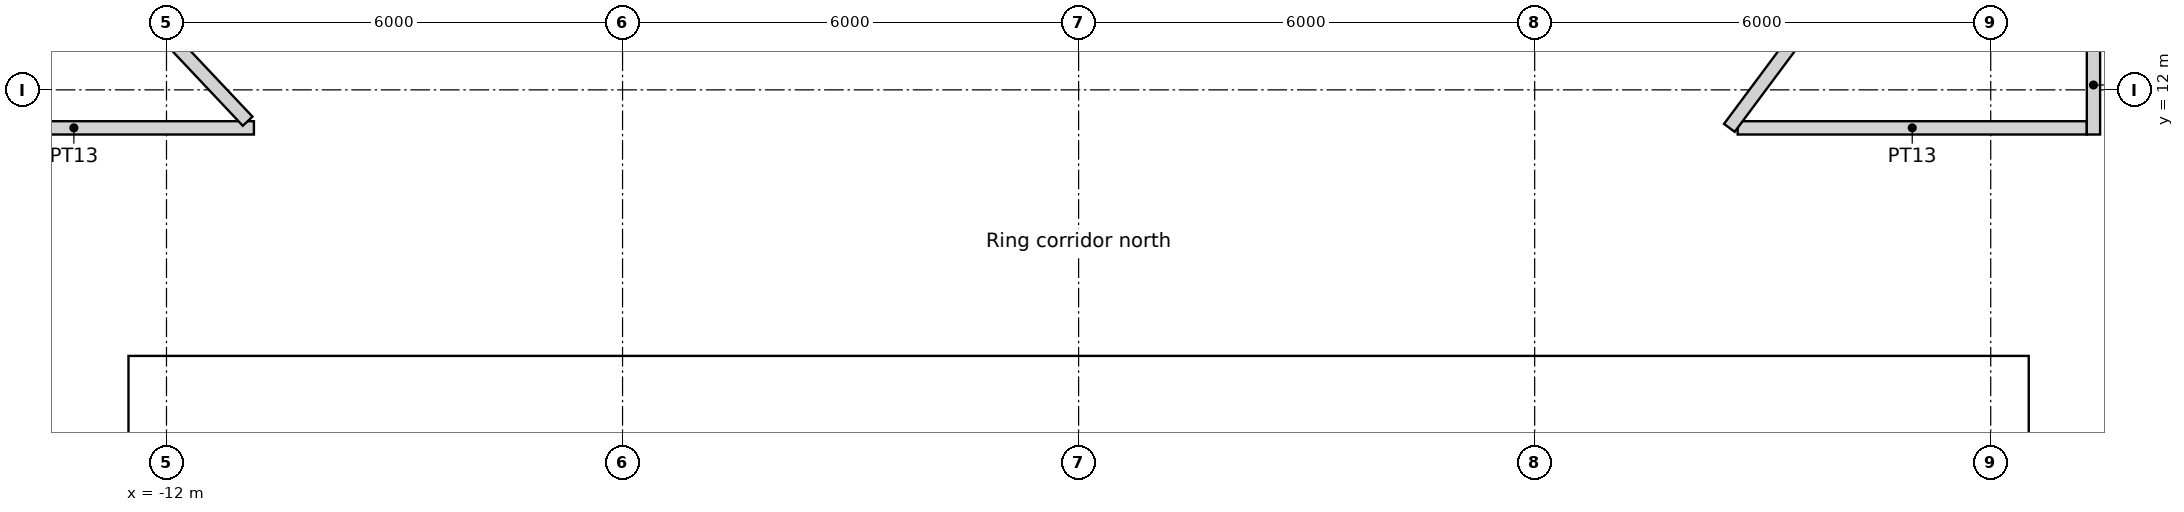
"""IFC4 building model, lengths in metres.
Left out: names, types, materials, properties, quantities, classifications, styles, units other than length and angle.
Written with IfcOpenShell. Run it as: python <this file> out.ifc"""

import sys

from ifc_helpers import new_model, si_unit, direction, frame, frame_2d, origin, origin_2d, place, context, subcontext, project, spatial, rectangle, circle, extrude, element, fill, save


model = new_model("IFC4")
c1 = context("Model", 3, precision=1e-05, world=origin(), true_north=direction((0.0, 1.0)))
c2 = subcontext(c1, "Body", "Model", "MODEL_VIEW")
j1 = project(units=[si_unit("LENGTHUNIT", "METRE"), si_unit("PLANEANGLEUNIT", "RADIAN")], contexts=[c1])
p1 = place(None, origin())
s1 = spatial("IfcSite", under=j1, at=p1, CompositionType="ELEMENT")
p2 = place(p1, origin())
s2 = spatial("IfcBuilding", under=s1, at=p2, CompositionType="ELEMENT")
p3 = place(p2, frame((0.0, 0.0, 219.6)))
s3 = spatial("IfcBuildingStorey", under=s2, at=p3, CompositionType="ELEMENT", Elevation=219.6)
p4 = place(p3, frame((-13.798, 12.802, 0.0), z_axis=(0.0, 0.0, 1.0), x_axis=(1.0, 0.0, 0.0)))
e1 = element("IfcColumn", 1, at=p4, inside=s3, PredefinedType="COLUMN", context=c2, shape_type="SweptSolid", body=[
    extrude(circle(Radius=0.65, at=origin_2d()), origin(), (0.0, 0.0, 1.0), 5.4),
])
p5 = place(p3, frame((-12.5, 8.05, 0.0), z_axis=(0.0, 0.0, 1.0), x_axis=(1.0, 0.0, 0.0)))
e2 = element("IfcWall", 2, at=p5, inside=s3, PredefinedType="SOLIDWALL", context=c2, shape_type="SweptSolid", body=[
    extrude(rectangle(XDim=25.0, YDim=0.9, at=frame_2d((12.5, 0.0))), origin(), (0.0, 0.0, 1.0), 5.4),
])
p6 = place(p5, frame((8.3, 0.0, 0.0)))
e3 = element("IfcOpeningElement", 3, at=p6, cuts=e2, PredefinedType="OPENING", context=c2, shape_type="SweptSolid", body=[
    extrude(rectangle(XDim=1.8, YDim=2.1, at=frame_2d((0.9, 1.05))), frame((0.0, 0.45, 0.0), z_axis=(0.0, -1.0, 0.0), x_axis=(1.0, 0.0, 0.0)), (0.0, 0.0, 1.0), 0.9),
])
p7 = place(p3, frame((-12.05, -7.6, 0.0), z_axis=(0.0, 0.0, 1.0), x_axis=(0.0, 1.0, 0.0)))
e4 = element("IfcWall", 4, at=p7, inside=s3, PredefinedType="SOLIDWALL", context=c2, shape_type="SweptSolid", body=[
    extrude(rectangle(XDim=15.2, YDim=0.9, at=frame_2d((7.6, 0.0))), origin(), (0.0, 0.0, 1.0), 5.4),
])
p8 = place(p7, frame((7.1, 0.0, 0.0)))
e5 = element("IfcOpeningElement", 5, at=p8, cuts=e4, PredefinedType="OPENING", context=c2, shape_type="SweptSolid", body=[
    extrude(rectangle(XDim=1.0, YDim=2.1, at=frame_2d((0.5, 1.05))), frame((0.0, 0.45, 0.0), z_axis=(0.0, -1.0, 0.0), x_axis=(1.0, 0.0, 0.0)), (0.0, 0.0, 1.0), 0.9),
])
p9 = place(p3, frame((12.05, -7.6, 0.0), z_axis=(0.0, 0.0, 1.0), x_axis=(0.0, 1.0, 0.0)))
e6 = element("IfcWall", 6, at=p9, inside=s3, PredefinedType="SOLIDWALL", context=c2, shape_type="SweptSolid", body=[
    extrude(rectangle(XDim=15.2, YDim=0.9, at=frame_2d((7.6, 0.0))), origin(), (0.0, 0.0, 1.0), 5.4),
])
p10 = place(p9, frame((5.1, 0.0, 0.0)))
e7 = element("IfcOpeningElement", 7, at=p10, cuts=e6, PredefinedType="OPENING", context=c2, shape_type="SweptSolid", body=[
    extrude(rectangle(XDim=1.0, YDim=2.1, at=frame_2d((0.5, 1.05))), frame((0.0, 0.45, 0.0), z_axis=(0.0, -1.0, 0.0), x_axis=(1.0, 0.0, 0.0)), (0.0, 0.0, 1.0), 0.9),
])
for number, where, z_axis, x_axis in (
    (8, (-2.25, 3.25, 0.0), (0.0, 0.0, 1.0), (0.0, 1.0, 0.0)),
    (9, (0.55, 3.25, 0.0), (0.0, 0.0, 1.0), (0.0, 1.0, 0.0)),
):
    element("IfcWall", number, at=place(p3, frame(where, z_axis=z_axis, x_axis=x_axis)), inside=s3, PredefinedType="SOLIDWALL", context=c2, shape_type="SweptSolid", body=[
        extrude(rectangle(XDim=4.35, YDim=0.3, at=frame_2d((2.175, 0.0))), origin(), (0.0, 0.0, 1.0), 4.9),
    ])
p11 = place(p3, frame((-9.05, -7.0, 0.0), z_axis=(0.0, 0.0, 1.0), x_axis=(0.0, 1.0, 0.0)))
e10 = element("IfcWall", 10, at=p11, inside=s3, PredefinedType="SOLIDWALL", context=c2, shape_type="SweptSolid", body=[
    extrude(rectangle(XDim=14.6, YDim=0.3, at=frame_2d((7.3, 0.0))), origin(), (0.0, 0.0, 1.0), 4.9),
])
p12 = place(p3, frame((-4.275, 6.7, 0.0), z_axis=(0.0, 0.0, 1.0), x_axis=(0.0, 1.0, 0.0)))
e11 = element("IfcWall", 11, at=p12, inside=s3, PredefinedType="SOLIDWALL", context=c2, shape_type="SweptSolid", body=[
    extrude(rectangle(XDim=0.9, YDim=0.15, at=frame_2d((0.45, 0.0))), origin(), (0.0, 0.0, 1.0), 4.9),
])
p13 = place(p3, frame((0.7, 7.15, 0.0), z_axis=(0.0, 0.0, 1.0), x_axis=(1.0, 0.0, 0.0)))
e12 = element("IfcWall", 12, at=p13, inside=s3, PredefinedType="SOLIDWALL", context=c2, shape_type="SweptSolid", body=[
    extrude(rectangle(XDim=8.35, YDim=0.9, at=frame_2d((4.175, 0.0))), origin(), (0.0, 0.0, 1.0), 4.9),
])
p14 = place(p3, frame((-17.587, 18.641, 0.0), z_axis=(0.0, 0.0, 1.0), x_axis=(0.686237518372, -0.727377528096, 0.0)))
e13 = element("IfcWall", 13, at=p14, inside=s3, PredefinedType="PARTITIONING", context=c2, shape_type="SweptSolid", body=[
    extrude(rectangle(XDim=9.697, YDim=0.175, at=frame_2d((4.848, 0.0))), origin(), (0.0, 0.0, 1.0), 4.1),
])
p15 = place(p3, frame((-10.85, 11.5, 0.0), z_axis=(0.0, 0.0, 1.0), x_axis=(-1.0, 0.0, 0.0)))
e14 = element("IfcWall", 14, at=p15, inside=s3, PredefinedType="PARTITIONING", context=c2, shape_type="SweptSolid", body=[
    extrude(rectangle(XDim=4.738, YDim=0.175, at=frame_2d((2.369, 0.0))), origin(), (0.0, 0.0, 1.0), 4.1),
])
p16 = place(p3, frame((13.264, 11.5, 0.0), z_axis=(0.0, 0.0, 1.0), x_axis=(-1.0, 0.0, 0.0)))
e15 = element("IfcWall", 15, at=p16, inside=s3, PredefinedType="PARTITIONING", context=c2, shape_type="SweptSolid", body=[
    extrude(rectangle(XDim=4.594, YDim=0.175, at=frame_2d((2.297, 0.0))), origin(), (0.0, 0.0, 1.0), 4.1),
])
p17 = place(p3, frame((13.352, 12.715, 0.0), z_axis=(0.0, 0.0, 1.0), x_axis=(0.0, -1.0, 0.0)))
e16 = element("IfcWall", 16, at=p17, inside=s3, PredefinedType="PARTITIONING", context=c2, shape_type="SweptSolid", body=[
    extrude(rectangle(XDim=1.303, YDim=0.175, at=frame_2d((0.651, 0.0))), origin(), (0.0, 0.0, 1.0), 4.1),
])
p18 = place(p3, frame((15.304, 20.556, 0.0), z_axis=(0.0, 0.0, 1.0), x_axis=(-0.597169661875, -0.802114951199, 0.0)))
e17 = element("IfcWall", 17, at=p18, inside=s3, PredefinedType="PARTITIONING", context=c2, shape_type="SweptSolid", body=[
    extrude(rectangle(XDim=11.291, YDim=0.175, at=frame_2d((5.645, 0.0))), origin(), (0.0, 0.0, 1.0), 4.1),
])
p19 = place(p6, origin())
e18 = element("IfcDoor", 18, at=p19, inside=s3, OperationType="DOUBLE_DOOR_SINGLE_SWING", PredefinedType="DOOR", context=c2, shape_type="SweptSolid", body=[
    extrude(rectangle(XDim=1.8, YDim=2.1, at=frame_2d((0.9, 1.05))), frame((0.0, 0.025, 0.0), z_axis=(0.0, -1.0, 0.0), x_axis=(1.0, 0.0, 0.0)), (0.0, 0.0, 1.0), 0.05),
])
fill(e3, e18)
save(model, sys.argv[1])
